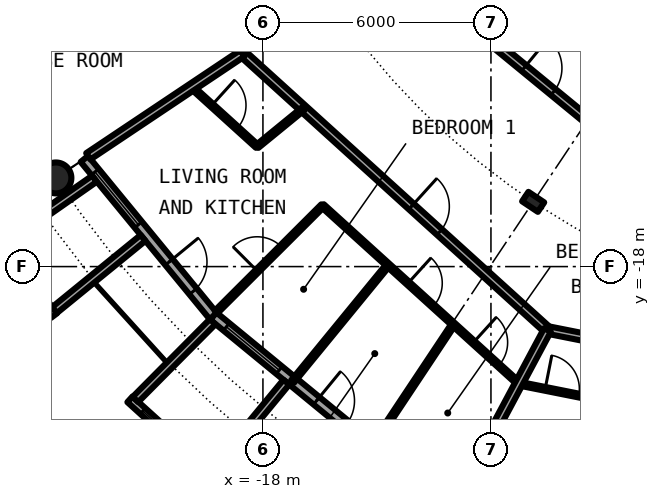
"""IFC4 building model, lengths in metres.
Left out: names, types, materials, properties, quantities, classifications, styles, units other than length and angle.
Written with IfcOpenShell. Run it as: python <this file> out.ifc"""

import sys

from ifc_helpers import new_model, si_unit, direction, frame, frame_2d, origin, origin_2d, place, context, subcontext, project, spatial, rectangle, circle, hollow_circle, i_section, extrude, element, fill, save


model = new_model("IFC4")
c1 = context("Model", 3, precision=1e-05, world=origin(), true_north=direction((0.0, 1.0)))
c2 = subcontext(c1, "Body", "Model", "MODEL_VIEW")
j1 = project(units=[si_unit("LENGTHUNIT", "METRE"), si_unit("PLANEANGLEUNIT", "RADIAN")], contexts=[c1])
p1 = place(None, origin())
s1 = spatial("IfcSite", under=j1, at=p1, CompositionType="ELEMENT")
p2 = place(p1, origin())
s2 = spatial("IfcBuilding", under=s1, at=p2, CompositionType="ELEMENT")
p3 = place(p2, frame((0.0, 0.0, 145.2)))
s3 = spatial("IfcBuildingStorey", under=s2, at=p3, CompositionType="ELEMENT", Elevation=145.2)
p4 = place(p3, frame((-23.448, -15.667, 0.0), z_axis=(0.0, 0.0, 1.0), x_axis=(1.0, 0.0, 0.0)))
e1 = element("IfcColumn", 1, at=p4, inside=s3, PredefinedType="COLUMN", context=c2, shape_type="SweptSolid", body=[
    extrude(hollow_circle(Radius=0.406, WallThickness=0.04, at=origin_2d()), origin(), (0.0, 0.0, 1.0), 3.05),
])
p5 = place(p3, frame((-10.889, -16.297, 0.0), z_axis=(0.0, 0.0, 1.0), x_axis=(-0.55557023302, -0.831469612303, 0.0)))
e2 = element("IfcColumn", 2, at=p5, inside=s3, PredefinedType="COLUMN", context=c2, shape_type="SweptSolid", body=[
    extrude(i_section(OverallWidth=0.3, OverallDepth=0.5, WebThickness=0.014, FlangeThickness=0.028, FilletRadius=0.027, at=origin_2d()), origin(), (0.0, 0.0, 1.0), 3.05),
])
p6 = place(p3, frame((-22.699, -15.167, 0.0), z_axis=(0.0, 0.0, 1.0), x_axis=(0.634382322723, -0.773019449054, 0.0)))
e3 = element("IfcWall", 3, at=p6, inside=s3, PredefinedType="SOLIDWALL", context=c2, shape_type="SweptSolid", body=[
    extrude(rectangle(XDim=5.352, YDim=0.25, at=frame_2d((2.676, 0.0))), origin(), (0.0, 0.0, 1.0), 2.7),
])
p7 = place(p6, frame((0.441, 0.0, 0.3)))
e4 = element("IfcOpeningElement", 4, at=p7, cuts=e3, PredefinedType="OPENING", context=c2, shape_type="SweptSolid", body=[
    extrude(rectangle(XDim=1.8, YDim=2.1, at=frame_2d((0.9, 1.05))), frame((0.0, 0.135, 0.0), z_axis=(0.0, -1.0, 0.0), x_axis=(1.0, 0.0, 0.0)), (0.0, 0.0, 1.0), 0.27),
])
p8 = place(p6, frame((3.51, 0.0, 0.0)))
e5 = element("IfcOpeningElement", 5, at=p8, cuts=e3, PredefinedType="OPENING", context=c2, shape_type="SweptSolid", body=[
    extrude(rectangle(XDim=1.0, YDim=2.2, at=frame_2d((0.5, 1.1))), frame((0.0, 0.135, 0.0), z_axis=(0.0, -1.0, 0.0), x_axis=(1.0, 0.0, 0.0)), (0.0, 0.0, 1.0), 0.27),
])
p9 = place(p3, frame((-24.972, -17.337, -0.03), z_axis=(0.0, 0.0, 1.0), x_axis=(0.602806268067, -0.797887588059, 0.0)))
e6 = element("IfcWall", 6, at=p9, inside=s3, PredefinedType="SOLIDWALL", context=c2, shape_type="SweptSolid", body=[
    extrude(rectangle(XDim=2.447, YDim=0.2, at=frame_2d((1.223, 0.0))), origin(), (0.0, 0.0, 1.0), 2.73),
])
p10 = place(p9, frame((0.183, 0.0, 0.33)))
e7 = element("IfcOpeningElement", 7, at=p10, cuts=e6, PredefinedType="OPENING", context=c2, shape_type="SweptSolid", body=[
    extrude(circle(Radius=1.04, at=frame_2d((1.04, 1.04))), frame((0.0, 0.11, 0.0), z_axis=(0.0, -1.0, 0.0), x_axis=(1.0, 0.0, 0.0)), (0.0, 0.0, 1.0), 0.22),
])
p11 = place(p3, frame((-22.433, -15.688, -0.03), z_axis=(0.0, 0.0, 1.0), x_axis=(-0.819373043115, -0.573260687834, 0.0)))
e8 = element("IfcWall", 8, at=p11, inside=s3, PredefinedType="SOLIDWALL", context=c2, shape_type="SweptSolid", body=[
    extrude(rectangle(XDim=2.925, YDim=0.2, at=frame_2d((1.463, 0.0))), origin(), (0.0, 0.0, 1.0), 2.73),
])
p12 = place(p3, frame((-21.155, -17.246, -0.03), z_axis=(0.0, 0.0, 1.0), x_axis=(-0.775179004516, -0.631741648902, 0.0)))
e9 = element("IfcWall", 9, at=p12, inside=s3, PredefinedType="SOLIDWALL", context=c2, shape_type="SweptSolid", body=[
    extrude(rectangle(XDim=3.006, YDim=0.2, at=frame_2d((1.503, 0.0))), origin(), (0.0, 0.0, 1.0), 2.73),
])
p13 = place(p3, frame((-19.304, -19.304, 0.0), z_axis=(0.0, 0.0, 1.0), x_axis=(0.773019449054, -0.634382322723, 0.0)))
e10 = element("IfcWall", 10, at=p13, inside=s3, PredefinedType="SOLIDWALL", context=c2, shape_type="SweptSolid", body=[
    extrude(rectangle(XDim=5.352, YDim=0.25, at=frame_2d((2.676, 0.0))), origin(), (0.0, 0.0, 1.0), 2.7),
])
p14 = place(p13, frame((0.441, 0.0, 0.3)))
e11 = element("IfcOpeningElement", 11, at=p14, cuts=e10, PredefinedType="OPENING", context=c2, shape_type="SweptSolid", body=[
    extrude(rectangle(XDim=1.8, YDim=2.1, at=frame_2d((0.9, 1.05))), frame((0.0, 0.135, 0.0), z_axis=(0.0, -1.0, 0.0), x_axis=(1.0, 0.0, 0.0)), (0.0, 0.0, 1.0), 0.27),
])
p15 = place(p13, frame((3.51, 0.0, 0.0)))
e12 = element("IfcOpeningElement", 12, at=p15, cuts=e10, PredefinedType="OPENING", context=c2, shape_type="SweptSolid", body=[
    extrude(rectangle(XDim=1.0, YDim=2.2, at=frame_2d((0.5, 1.1))), frame((0.0, 0.135, 0.0), z_axis=(0.0, -1.0, 0.0), x_axis=(1.0, 0.0, 0.0)), (0.0, 0.0, 1.0), 0.27),
])
p16 = place(p3, frame((-21.5, -21.493, -0.03), z_axis=(0.0, 0.0, 1.0), x_axis=(0.740998365753, -0.671506829416, 0.0)))
e13 = element("IfcWall", 13, at=p16, inside=s3, PredefinedType="SOLIDWALL", context=c2, shape_type="SweptSolid", body=[
    extrude(rectangle(XDim=2.993, YDim=0.2, at=frame_2d((1.497, 0.0))), origin(), (0.0, 0.0, 1.0), 2.73),
])
p17 = place(p16, frame((0.457, 0.0, 0.33)))
e14 = element("IfcOpeningElement", 14, at=p17, cuts=e13, PredefinedType="OPENING", context=c2, shape_type="SweptSolid", body=[
    extrude(circle(Radius=1.04, at=frame_2d((1.04, 1.04))), frame((0.0, 0.11, 0.0), z_axis=(0.0, -1.0, 0.0), x_axis=(1.0, 0.0, 0.0)), (0.0, 0.0, 1.0), 0.22),
])
p18 = place(p3, frame((-19.323, -19.45, -0.03), z_axis=(0.0, 0.0, 1.0), x_axis=(-0.704476739375, -0.709727076896, 0.0)))
e15 = element("IfcWall", 15, at=p18, inside=s3, PredefinedType="SOLIDWALL", context=c2, shape_type="SweptSolid", body=[
    extrude(rectangle(XDim=2.883, YDim=0.2, at=frame_2d((1.441, 0.0))), origin(), (0.0, 0.0, 1.0), 2.73),
])
p19 = place(p3, frame((-17.384, -21.041, -0.03), z_axis=(0.0, 0.0, 1.0), x_axis=(-0.63709551667, -0.770784861449, 0.0)))
e16 = element("IfcWall", 16, at=p19, inside=s3, PredefinedType="SOLIDWALL", context=c2, shape_type="SweptSolid", body=[
    extrude(rectangle(XDim=3.006, YDim=0.2, at=frame_2d((1.503, 0.0))), origin(), (0.0, 0.0, 1.0), 2.73),
])
p20 = place(p3, frame((-19.872, -13.278, 0.0), z_axis=(0.0, 0.0, 1.0), x_axis=(0.740990220108, -0.671515817911, 0.0)))
e17 = element("IfcWall", 17, at=p20, inside=s3, PredefinedType="PARTITIONING", context=c2, shape_type="SweptSolid", body=[
    extrude(rectangle(XDim=2.323, YDim=0.1, at=frame_2d((1.161, 0.0))), origin(), (0.0, 0.0, 1.0), 2.7),
])
p21 = place(p20, frame((0.711, 0.0, 0.0)))
e18 = element("IfcOpeningElement", 18, at=p21, cuts=e17, PredefinedType="OPENING", context=c2, shape_type="SweptSolid", body=[
    extrude(rectangle(XDim=0.9, YDim=2.3, at=frame_2d((0.45, 1.15))), frame((0.0, 0.06, 0.0), z_axis=(0.0, -1.0, 0.0), x_axis=(1.0, 0.0, 0.0)), (0.0, 0.0, 1.0), 0.12),
])
p22 = place(p3, frame((-16.432, -16.396, 0.0), z_axis=(0.0, 0.0, 1.0), x_axis=(0.740901429238, -0.671613781986, 0.0)))
e19 = element("IfcWall", 19, at=p22, inside=s3, PredefinedType="PARTITIONING", context=c2, shape_type="SweptSolid", body=[
    extrude(rectangle(XDim=6.97, YDim=0.1, at=frame_2d((3.485, 0.0))), origin(), (0.0, 0.0, 1.0), 2.7),
])
p23 = place(p22, frame((3.038, 0.0, 0.0)))
e20 = element("IfcOpeningElement", 20, at=p23, cuts=e19, PredefinedType="OPENING", context=c2, shape_type="SweptSolid", body=[
    extrude(rectangle(XDim=0.9, YDim=2.3, at=frame_2d((0.45, 1.15))), frame((0.0, 0.06, 0.0), z_axis=(0.0, -1.0, 0.0), x_axis=(1.0, 0.0, 0.0)), (0.0, 0.0, 1.0), 0.12),
])
p24 = place(p22, frame((5.36, 0.0, 0.0)))
e21 = element("IfcOpeningElement", 21, at=p24, cuts=e19, PredefinedType="OPENING", context=c2, shape_type="SweptSolid", body=[
    extrude(rectangle(XDim=0.9, YDim=2.3, at=frame_2d((0.45, 1.15))), frame((0.0, 0.06, 0.0), z_axis=(0.0, -1.0, 0.0), x_axis=(1.0, 0.0, 0.0)), (0.0, 0.0, 1.0), 0.12),
])
p25 = place(p3, frame((-11.264, -21.08, 0.0), z_axis=(0.0, 0.0, 1.0), x_axis=(0.980795304313, -0.195039921651, 0.0)))
e22 = element("IfcWall", 22, at=p25, inside=s3, PredefinedType="PARTITIONING", context=c2, shape_type="SweptSolid", body=[
    extrude(rectangle(XDim=6.937, YDim=0.1, at=frame_2d((3.469, 0.0))), origin(), (0.0, 0.0, 1.0), 2.7),
])
p26 = place(p25, frame((3.016, 0.0, 0.0)))
e23 = element("IfcOpeningElement", 23, at=p26, cuts=e22, PredefinedType="OPENING", context=c2, shape_type="SweptSolid", body=[
    extrude(rectangle(XDim=0.9, YDim=2.3, at=frame_2d((0.45, 1.15))), frame((0.0, 0.06, 0.0), z_axis=(0.0, -1.0, 0.0), x_axis=(1.0, 0.0, 0.0)), (0.0, 0.0, 1.0), 0.12),
])
p27 = place(p25, frame((0.704, 0.0, 0.0)))
e24 = element("IfcOpeningElement", 24, at=p27, cuts=e22, PredefinedType="OPENING", context=c2, shape_type="SweptSolid", body=[
    extrude(rectangle(XDim=0.9, YDim=2.3, at=frame_2d((0.45, 1.15))), frame((0.0, 0.06, 0.0), z_axis=(0.0, -1.0, 0.0), x_axis=(1.0, 0.0, 0.0)), (0.0, 0.0, 1.0), 0.12),
])
p28 = place(p3, frame((-19.307, -10.935, 0.0), z_axis=(0.0, 0.0, 1.0), x_axis=(0.465605550524, -0.884992356646, 0.0)))
e25 = element("IfcWall", 25, at=p28, inside=s3, PredefinedType="PARTITIONING", context=c2, shape_type="SweptSolid", body=[
    extrude(rectangle(XDim=1.643, YDim=0.2, at=frame_2d((0.821, 0.0))), origin(), (0.0, 0.0, 1.0), 2.7),
])
p29 = place(p3, frame((-18.542, -12.389, 0.0), z_axis=(0.0, 0.0, 1.0), x_axis=(0.740947367223, -0.671563101283, 0.0)))
e26 = element("IfcWall", 26, at=p29, inside=s3, PredefinedType="PARTITIONING", context=c2, shape_type="SweptSolid", body=[
    extrude(rectangle(XDim=10.837, YDim=0.2, at=frame_2d((5.419, 0.0))), origin(), (0.0, 0.0, 1.0), 2.7),
])
p30 = place(p29, frame((6.002, 0.0, 0.0)))
e27 = element("IfcOpeningElement", 27, at=p30, cuts=e26, PredefinedType="OPENING", context=c2, shape_type="SweptSolid", body=[
    extrude(rectangle(XDim=1.0, YDim=2.3, at=frame_2d((0.5, 1.15))), frame((0.0, 0.11, 0.0), z_axis=(0.0, -1.0, 0.0), x_axis=(1.0, 0.0, 0.0)), (0.0, 0.0, 1.0), 0.22),
])
p31 = place(p3, frame((-10.512, -19.667, 0.0), z_axis=(0.0, 0.0, 1.0), x_axis=(0.980780341017, -0.195115152343, 0.0)))
e28 = element("IfcWall", 28, at=p31, inside=s3, PredefinedType="PARTITIONING", context=c2, shape_type="SweptSolid", body=[
    extrude(rectangle(XDim=12.947, YDim=0.2, at=frame_2d((6.473, 0.0))), origin(), (0.0, 0.0, 1.0), 2.7),
])
p32 = place(p31, frame((4.894, 0.0, 0.0)))
e29 = element("IfcOpeningElement", 29, at=p32, cuts=e28, PredefinedType="OPENING", context=c2, shape_type="SweptSolid", body=[
    extrude(rectangle(XDim=1.0, YDim=2.3, at=frame_2d((0.5, 1.15))), frame((0.0, 0.11, 0.0), z_axis=(0.0, -1.0, 0.0), x_axis=(1.0, 0.0, 0.0)), (0.0, 0.0, 1.0), 0.22),
])
p33 = place(p3, frame((-14.717, -9.834, 0.0), z_axis=(0.0, 0.0, 1.0), x_axis=(0.773034536097, -0.634363938131, 0.0)))
e30 = element("IfcWall", 30, at=p33, inside=s3, PredefinedType="PARTITIONING", context=c2, shape_type="SweptSolid", body=[
    extrude(rectangle(XDim=10.277, YDim=0.2, at=frame_2d((5.138, 0.0))), origin(), (0.0, 0.0, 1.0), 2.7),
])
p34 = place(p33, frame((4.638, 0.0, 0.0)))
e31 = element("IfcOpeningElement", 31, at=p34, cuts=e30, PredefinedType="OPENING", context=c2, shape_type="SweptSolid", body=[
    extrude(rectangle(XDim=1.0, YDim=2.3, at=frame_2d((0.5, 1.15))), frame((0.0, 0.11, 0.0), z_axis=(0.0, -1.0, 0.0), x_axis=(1.0, 0.0, 0.0)), (0.0, 0.0, 1.0), 0.22),
])
p35 = place(p3, frame((-22.595, -15.098, 0.0), z_axis=(0.0, 0.0, 1.0), x_axis=(0.831387096605, 0.55569370664, 0.0)))
e32 = element("IfcWall", 32, at=p35, inside=s3, PredefinedType="PARTITIONING", context=c2, shape_type="SweptSolid", body=[
    extrude(rectangle(XDim=4.875, YDim=0.2, at=frame_2d((2.438, 0.0))), origin(), (0.0, 0.0, 1.0), 2.7),
])
p36 = place(p3, frame((-19.234, -19.197, 0.0), z_axis=(0.0, 0.0, 1.0), x_axis=(0.707722727509, 0.706490297858, 0.0)))
e33 = element("IfcWall", 33, at=p36, inside=s3, PredefinedType="PARTITIONING", context=c2, shape_type="SweptSolid", body=[
    extrude(rectangle(XDim=3.962, YDim=0.1, at=frame_2d((1.981, 0.0))), origin(), (0.0, 0.0, 1.0), 2.7),
])
p37 = place(p36, frame((1.531, 0.0, 0.0)))
e34 = element("IfcOpeningElement", 34, at=p37, cuts=e33, PredefinedType="OPENING", context=c2, shape_type="SweptSolid", body=[
    extrude(rectangle(XDim=0.9, YDim=2.3, at=frame_2d((0.45, 1.15))), frame((0.0, 0.06, 0.0), z_axis=(0.0, -1.0, 0.0), x_axis=(1.0, 0.0, 0.0)), (0.0, 0.0, 1.0), 0.12),
])
p38 = place(p3, frame((-18.151, -14.838, 0.0), z_axis=(0.0, 0.0, 1.0), x_axis=(0.774283039722, 0.632839453889, 0.0)))
e35 = element("IfcWall", 35, at=p38, inside=s3, PredefinedType="PARTITIONING", context=c2, shape_type="SweptSolid", body=[
    extrude(rectangle(XDim=1.569, YDim=0.1, at=frame_2d((0.785, 0.0))), origin(), (0.0, 0.0, 1.0), 2.7),
])
p39 = place(p3, frame((-17.219, -21.023, 0.0), z_axis=(0.0, 0.0, 1.0), x_axis=(0.633590098448, 0.773668913133, 0.0)))
e36 = element("IfcWall", 36, at=p39, inside=s3, PredefinedType="PARTITIONING", context=c2, shape_type="SweptSolid", body=[
    extrude(rectangle(XDim=3.962, YDim=0.1, at=frame_2d((1.981, 0.0))), origin(), (0.0, 0.0, 1.0), 2.7),
])
p40 = place(p3, frame((-15.054, -22.624, 0.0), z_axis=(0.0, 0.0, 1.0), x_axis=(0.553823887887, 0.83263383381, 0.0)))
e37 = element("IfcWall", 37, at=p40, inside=s3, PredefinedType="PARTITIONING", context=c2, shape_type="SweptSolid", body=[
    extrude(rectangle(XDim=3.73, YDim=0.1, at=frame_2d((1.865, 0.0))), origin(), (0.0, 0.0, 1.0), 2.7),
])
p41 = place(p3, frame((-12.81, -23.966, 0.0), z_axis=(0.0, 0.0, 1.0), x_axis=(0.471427642527, 0.881904744211, 0.0)))
e38 = element("IfcWall", 38, at=p41, inside=s3, PredefinedType="PARTITIONING", context=c2, shape_type="SweptSolid", body=[
    extrude(rectangle(XDim=4.875, YDim=0.2, at=frame_2d((2.438, 0.0))), origin(), (0.0, 0.0, 1.0), 2.7),
])
p42 = place(p3, frame((-10.479, -25.073, 0.0), z_axis=(0.0, 0.0, 1.0), x_axis=(0.385572005139, 0.922677749192, 0.0)))
e39 = element("IfcWall", 39, at=p42, inside=s3, PredefinedType="PARTITIONING", context=c2, shape_type="SweptSolid", body=[
    extrude(rectangle(XDim=3.841, YDim=0.1, at=frame_2d((1.92, 0.0))), origin(), (0.0, 0.0, 1.0), 2.7),
])
p43 = place(p7, origin())
e40 = element("IfcWindow", 40, at=p43, inside=s3, PartitioningType="SINGLE_PANEL", PredefinedType="WINDOW", context=c2, shape_type="SweptSolid", body=[
    extrude(rectangle(XDim=1.8, YDim=2.1, at=frame_2d((0.9, 1.05))), frame((0.0, 0.03, 0.0), z_axis=(0.0, -1.0, 0.0), x_axis=(1.0, 0.0, 0.0)), (0.0, 0.0, 1.0), 0.06),
])
fill(e4, e40)
p44 = place(p8, origin())
e41 = element("IfcDoor", 41, at=p44, inside=s3, OperationType="SINGLE_SWING_LEFT", PredefinedType="DOOR", context=c2, shape_type="SweptSolid", body=[
    extrude(rectangle(XDim=1.0, YDim=2.2, at=frame_2d((0.5, 1.1))), frame((0.0, 0.025, 0.0), z_axis=(0.0, -1.0, 0.0), x_axis=(1.0, 0.0, 0.0)), (0.0, 0.0, 1.0), 0.05),
])
fill(e5, e41)
p45 = place(p14, origin())
e42 = element("IfcWindow", 42, at=p45, inside=s3, PartitioningType="SINGLE_PANEL", PredefinedType="WINDOW", context=c2, shape_type="SweptSolid", body=[
    extrude(rectangle(XDim=1.8, YDim=2.1, at=frame_2d((0.9, 1.05))), frame((0.0, 0.03, 0.0), z_axis=(0.0, -1.0, 0.0), x_axis=(1.0, 0.0, 0.0)), (0.0, 0.0, 1.0), 0.06),
])
fill(e11, e42)
p46 = place(p17, origin())
e43 = element("IfcWindow", 43, at=p46, inside=s3, PartitioningType="SINGLE_PANEL", PredefinedType="WINDOW", context=c2, shape_type="SweptSolid", body=[
    extrude(circle(Radius=1.04, at=frame_2d((1.04, 1.04))), frame((0.0, 0.03, 0.0), z_axis=(0.0, -1.0, 0.0), x_axis=(1.0, 0.0, 0.0)), (0.0, 0.0, 1.0), 0.06),
])
fill(e14, e43)
p47 = place(p15, origin())
e44 = element("IfcDoor", 44, at=p47, inside=s3, OperationType="SINGLE_SWING_LEFT", PredefinedType="DOOR", context=c2, shape_type="SweptSolid", body=[
    extrude(rectangle(XDim=1.0, YDim=2.2, at=frame_2d((0.5, 1.1))), frame((0.0, 0.025, 0.0), z_axis=(0.0, -1.0, 0.0), x_axis=(1.0, 0.0, 0.0)), (0.0, 0.0, 1.0), 0.05),
])
fill(e12, e44)
p48 = place(p30, origin())
e45 = element("IfcDoor", 45, at=p48, inside=s3, OperationType="SINGLE_SWING_RIGHT", PredefinedType="DOOR", context=c2, shape_type="SweptSolid", body=[
    extrude(rectangle(XDim=1.0, YDim=2.3, at=frame_2d((0.5, 1.15))), frame((0.0, 0.025, 0.0), z_axis=(0.0, -1.0, 0.0), x_axis=(1.0, 0.0, 0.0)), (0.0, 0.0, 1.0), 0.05),
])
fill(e27, e45)
p49 = place(p21, origin())
e46 = element("IfcDoor", 46, at=p49, inside=s3, OperationType="SINGLE_SWING_RIGHT", PredefinedType="DOOR", context=c2, shape_type="SweptSolid", body=[
    extrude(rectangle(XDim=0.9, YDim=2.3, at=frame_2d((0.45, 1.15))), frame((0.0, 0.025, 0.0), z_axis=(0.0, -1.0, 0.0), x_axis=(1.0, 0.0, 0.0)), (0.0, 0.0, 1.0), 0.05),
])
fill(e18, e46)
p50 = place(p37, origin())
e47 = element("IfcDoor", 47, at=p50, inside=s3, OperationType="SINGLE_SWING_LEFT", PredefinedType="DOOR", context=c2, shape_type="SweptSolid", body=[
    extrude(rectangle(XDim=0.9, YDim=2.3, at=frame_2d((0.45, 1.15))), frame((0.0, 0.025, 0.0), z_axis=(0.0, -1.0, 0.0), x_axis=(1.0, 0.0, 0.0)), (0.0, 0.0, 1.0), 0.05),
])
fill(e34, e47)
p51 = place(p23, origin())
e48 = element("IfcDoor", 48, at=p51, inside=s3, OperationType="SINGLE_SWING_RIGHT", PredefinedType="DOOR", context=c2, shape_type="SweptSolid", body=[
    extrude(rectangle(XDim=0.9, YDim=2.3, at=frame_2d((0.45, 1.15))), frame((0.0, 0.025, 0.0), z_axis=(0.0, -1.0, 0.0), x_axis=(1.0, 0.0, 0.0)), (0.0, 0.0, 1.0), 0.05),
])
fill(e20, e48)
p52 = place(p24, origin())
e49 = element("IfcDoor", 49, at=p52, inside=s3, OperationType="SINGLE_SWING_RIGHT", PredefinedType="DOOR", context=c2, shape_type="SweptSolid", body=[
    extrude(rectangle(XDim=0.9, YDim=2.3, at=frame_2d((0.45, 1.15))), frame((0.0, 0.025, 0.0), z_axis=(0.0, -1.0, 0.0), x_axis=(1.0, 0.0, 0.0)), (0.0, 0.0, 1.0), 0.05),
])
fill(e21, e49)
p53 = place(p27, origin())
e50 = element("IfcDoor", 50, at=p53, inside=s3, OperationType="SINGLE_SWING_LEFT", PredefinedType="DOOR", context=c2, shape_type="SweptSolid", body=[
    extrude(rectangle(XDim=0.9, YDim=2.3, at=frame_2d((0.45, 1.15))), frame((0.0, 0.025, 0.0), z_axis=(0.0, -1.0, 0.0), x_axis=(1.0, 0.0, 0.0)), (0.0, 0.0, 1.0), 0.05),
])
fill(e24, e50)
p54 = place(p34, origin())
e51 = element("IfcDoor", 51, at=p54, inside=s3, OperationType="SINGLE_SWING_LEFT", PredefinedType="DOOR", context=c2, shape_type="SweptSolid", body=[
    extrude(rectangle(XDim=1.0, YDim=2.3, at=frame_2d((0.5, 1.15))), frame((0.0, 0.025, 0.0), z_axis=(0.0, -1.0, 0.0), x_axis=(1.0, 0.0, 0.0)), (0.0, 0.0, 1.0), 0.05),
])
fill(e31, e51)
save(model, sys.argv[1])
